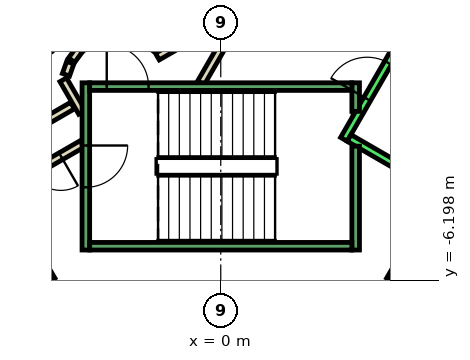
"""IFC4 building model, lengths in metres.
Left out: names, types, materials, properties, quantities, classifications, styles, units other than length and angle.
Written with IfcOpenShell. Run it as: python <this file> out.ifc"""

import sys

from ifc_helpers import new_model, si_unit, direction, frame, frame_2d, origin, place, context, subcontext, project, spatial, rectangle, extrude, element, fill, save


model = new_model("IFC4")
c1 = context("Model", 3, precision=1e-05, world=origin(), true_north=direction((0.0, 1.0)))
c2 = subcontext(c1, "Body", "Model", "MODEL_VIEW")
j1 = project(units=[si_unit("LENGTHUNIT", "METRE"), si_unit("PLANEANGLEUNIT", "RADIAN")], contexts=[c1])
p1 = place(None, origin())
s1 = spatial("IfcSite", under=j1, at=p1, CompositionType="ELEMENT")
p2 = place(p1, origin())
s2 = spatial("IfcBuilding", under=s1, at=p2, CompositionType="ELEMENT")
p3 = place(p2, frame((0.0, 0.0, 124.4)))
s3 = spatial("IfcBuildingStorey", under=s2, at=p3, CompositionType="ELEMENT", Elevation=124.4)
p4 = place(p3, frame((-3.9, -1.599, 0.0), z_axis=(0.0, 0.0, 1.0), x_axis=(-0.865969445389, -0.500096910261, 0.0)))
e1 = element("IfcWall", 1, at=p4, inside=s3, PredefinedType="PARTITIONING", context=c2, shape_type="SweptSolid", body=[
    extrude(rectangle(XDim=1.373, YDim=0.2, at=frame_2d((0.687, 0.0))), origin(), (0.0, 0.0, 1.0), 3.8),
])
p5 = place(p3, frame((-3.65, -2.61, 0.0), z_axis=(0.0, 0.0, 1.0), x_axis=(-0.866072462134, -0.499918483688, 0.0)))
e2 = element("IfcWall", 2, at=p5, inside=s3, PredefinedType="PARTITIONING", context=c2, shape_type="SweptSolid", body=[
    extrude(rectangle(XDim=2.084, YDim=0.2, at=frame_2d((1.042, 0.0))), origin(), (0.0, 0.0, 1.0), 3.8),
])
p6 = place(p5, frame((0.642, 0.0, 0.0)))
e3 = element("IfcOpeningElement", 3, at=p6, cuts=e2, PredefinedType="OPENING", context=c2, shape_type="SweptSolid", body=[
    extrude(rectangle(XDim=0.9, YDim=2.1, at=frame_2d((0.45, 1.05))), frame((0.0, 0.11, 0.0), z_axis=(0.0, -1.0, 0.0), x_axis=(1.0, 0.0, 0.0)), (0.0, 0.0, 1.0), 0.22),
])
p7 = place(p3, frame((-4.145, -0.92, 0.0), z_axis=(0.0, 0.0, 1.0), x_axis=(0.499743786207, -0.866173278362, 0.0)))
e4 = element("IfcWall", 4, at=p7, inside=s3, PredefinedType="PARTITIONING", context=c2, shape_type="SweptSolid", body=[
    extrude(rectangle(XDim=0.991, YDim=0.2, at=frame_2d((0.495, 0.0))), origin(), (0.0, 0.0, 1.0), 3.8),
])
p8 = place(p3, frame((-0.52, -1.0, 0.0), z_axis=(0.0, 0.0, 1.0), x_axis=(0.50011622646, 0.865958290007, 0.0)))
e5 = element("IfcWall", 5, at=p8, inside=s3, PredefinedType="PARTITIONING", context=c2, shape_type="SweptSolid", body=[
    extrude(rectangle(XDim=4.991, YDim=0.2, at=frame_2d((2.496, 0.0))), origin(), (0.0, 0.0, 1.0), 3.8),
])
p9 = place(p8, frame((1.945, 0.0, 0.0)))
e6 = element("IfcOpeningElement", 6, at=p9, cuts=e5, PredefinedType="OPENING", context=c2, shape_type="SweptSolid", body=[
    extrude(rectangle(XDim=1.0, YDim=2.1, at=frame_2d((0.5, 1.05))), frame((0.0, 0.11, 0.0), z_axis=(0.0, -1.0, 0.0), x_axis=(1.0, 0.0, 0.0)), (0.0, 0.0, 1.0), 0.22),
])
p10 = place(p3, frame((-0.412, 0.414, 0.0), z_axis=(0.0, 0.0, 1.0), x_axis=(-0.866017369001, -0.500013916395, 0.0)))
e7 = element("IfcWall", 7, at=p10, inside=s3, PredefinedType="PARTITIONING", context=c2, shape_type="SweptSolid", body=[
    extrude(rectangle(XDim=1.45, YDim=0.2, at=frame_2d((0.725, 0.0))), origin(), (0.0, 0.0, 1.0), 3.8),
])
p11 = place(p3, frame((-3.723, -0.131, 0.0), z_axis=(0.0, 0.0, 1.0), x_axis=(-0.594675113454, -0.803966112121, 0.0)))
e8 = element("IfcWall", 8, at=p11, inside=s3, PredefinedType="PARTITIONING", context=c2, shape_type="SweptSolid", body=[
    extrude(rectangle(XDim=0.338, YDim=0.2, at=frame_2d((0.169, 0.0))), origin(), (0.0, 0.0, 1.0), 3.8),
])
p12 = place(p3, frame((-3.96, -0.47, 0.0), z_axis=(0.0, 0.0, 1.0), x_axis=(-0.334824194261, -0.942280615813, 0.0)))
e9 = element("IfcWall", 9, at=p12, inside=s3, PredefinedType="PARTITIONING", context=c2, shape_type="SweptSolid", body=[
    extrude(rectangle(XDim=0.338, YDim=0.2, at=frame_2d((0.169, 0.0))), origin(), (0.0, 0.0, 1.0), 3.8),
])
p13 = place(p3, frame((-9.751, 2.99, 0.0), z_axis=(0.0, 0.0, 1.0), x_axis=(0.50000090737, -0.866024879913, 0.0)))
e10 = element("IfcWall", 10, at=p13, inside=s3, PredefinedType="STANDARD", context=c2, shape_type="SweptSolid", body=[
    extrude(rectangle(XDim=10.6, YDim=0.2, at=frame_2d((5.3, 0.0))), origin(), (0.0, 0.0, 1.0), 3.8),
])
p14 = place(p3, frame((3.24, -2.488, 0.0), z_axis=(0.0, 0.0, 1.0), x_axis=(0.49994636267, 0.866056369097, 0.0)))
e11 = element("IfcWall", 11, at=p14, inside=s3, PredefinedType="STANDARD", context=c2, shape_type="SweptSolid", body=[
    extrude(rectangle(XDim=2.8, YDim=0.2, at=frame_2d((1.4, 0.0))), origin(), (0.0, 0.0, 1.0), 3.8),
])
p15 = place(p14, frame((1.225, 0.0, 0.0)))
e12 = element("IfcOpeningElement", 12, at=p15, cuts=e11, PredefinedType="OPENING", context=c2, shape_type="SweptSolid", body=[
    extrude(rectangle(XDim=1.1, YDim=2.1, at=frame_2d((0.55, 1.05))), frame((0.0, 0.11, 0.0), z_axis=(0.0, -1.0, 0.0), x_axis=(1.0, 0.0, 0.0)), (0.0, 0.0, 1.0), 0.22),
])
p16 = place(p3, frame((3.377, -2.452, 0.0), z_axis=(0.0, 0.0, 1.0), x_axis=(0.865955154139, -0.50012165622, 0.0)))
e13 = element("IfcWall", 13, at=p16, inside=s3, PredefinedType="STANDARD", context=c2, shape_type="SweptSolid", body=[
    extrude(rectangle(XDim=2.4, YDim=0.2, at=frame_2d((1.2, 0.0))), origin(), (0.0, 0.0, 1.0), 3.8),
])
p17 = place(p3, frame((4.451, -6.19, 0.0), z_axis=(0.0, 0.0, 1.0), x_axis=(0.50000090737, 0.866024879913, 0.0)))
e14 = element("IfcWall", 14, at=p17, inside=s3, PredefinedType="STANDARD", context=c2, shape_type="SweptSolid", body=[
    extrude(rectangle(XDim=10.6, YDim=0.2, at=frame_2d((5.3, 0.0))), origin(), (0.0, 0.0, 1.0), 3.8),
])
p18 = place(p3, frame((-3.55, -1.0, 0.0), z_axis=(0.0, 0.0, 1.0), x_axis=(0.0, -1.0, 0.0)))
e15 = element("IfcWall", 15, at=p18, inside=s3, PredefinedType="STANDARD", context=c2, shape_type="SweptSolid", body=[
    extrude(rectangle(XDim=4.4, YDim=0.2, at=frame_2d((2.2, 0.0))), origin(), (0.0, 0.0, 1.0), 3.8),
])
p19 = place(p18, frame((1.65, 0.0, 0.0)))
e16 = element("IfcOpeningElement", 16, at=p19, cuts=e15, PredefinedType="OPENING", context=c2, shape_type="SweptSolid", body=[
    extrude(rectangle(XDim=1.1, YDim=2.2, at=frame_2d((0.55, 1.1))), frame((0.0, 0.11, 0.0), z_axis=(0.0, -1.0, 0.0), x_axis=(1.0, 0.0, 0.0)), (0.0, 0.0, 1.0), 0.22),
])
p20 = place(p3, frame((3.55, -2.667, 0.0), z_axis=(0.0, 0.0, 1.0), x_axis=(0.0, -1.0, 0.0)))
e17 = element("IfcWall", 17, at=p20, inside=s3, PredefinedType="STANDARD", context=c2, shape_type="SweptSolid", body=[
    extrude(rectangle(XDim=2.733, YDim=0.2, at=frame_2d((1.366, 0.0))), origin(), (0.0, 0.0, 1.0), 3.8),
])
p21 = place(p3, frame((3.55, -1.0, 0.0), z_axis=(0.0, 0.0, 1.0), x_axis=(0.0, -1.0, 0.0)))
e18 = element("IfcWall", 18, at=p21, inside=s3, PredefinedType="STANDARD", context=c2, shape_type="SweptSolid", body=[
    extrude(rectangle(XDim=0.751, YDim=0.2, at=frame_2d((0.375, 0.0))), origin(), (0.0, 0.0, 1.0), 3.8),
])
p22 = place(p3, frame((-3.45, -1.1, 0.0), z_axis=(0.0, 0.0, 1.0), x_axis=(1.0, 0.0, 0.0)))
e19 = element("IfcWall", 19, at=p22, inside=s3, PredefinedType="STANDARD", context=c2, shape_type="SweptSolid", body=[
    extrude(rectangle(XDim=6.9, YDim=0.2, at=frame_2d((3.45, 0.0))), origin(), (0.0, 0.0, 1.0), 3.8),
])
p23 = place(p22, frame((0.45, 0.0, 0.0)))
e20 = element("IfcOpeningElement", 20, at=p23, cuts=e19, PredefinedType="OPENING", context=c2, shape_type="SweptSolid", body=[
    extrude(rectangle(XDim=1.1, YDim=2.2, at=frame_2d((0.55, 1.1))), frame((0.0, 0.11, 0.0), z_axis=(0.0, -1.0, 0.0), x_axis=(1.0, 0.0, 0.0)), (0.0, 0.0, 1.0), 0.22),
])
p24 = place(p3, frame((-3.45, -5.3, 0.0), z_axis=(0.0, 0.0, 1.0), x_axis=(1.0, 0.0, 0.0)))
e21 = element("IfcWall", 21, at=p24, inside=s3, PredefinedType="STANDARD", context=c2, shape_type="SweptSolid", body=[
    extrude(rectangle(XDim=6.9, YDim=0.2, at=frame_2d((3.45, 0.0))), origin(), (0.0, 0.0, 1.0), 3.8),
])
p25 = place(p6, origin())
e22 = element("IfcDoor", 22, at=p25, inside=s3, OperationType="SINGLE_SWING_LEFT", PredefinedType="DOOR", context=c2, shape_type="SweptSolid", body=[
    extrude(rectangle(XDim=0.9, YDim=2.1, at=frame_2d((0.45, 1.05))), frame((0.0, 0.025, 0.0), z_axis=(0.0, -1.0, 0.0), x_axis=(1.0, 0.0, 0.0)), (0.0, 0.0, 1.0), 0.05),
])
fill(e3, e22)
p26 = place(p15, origin())
e23 = element("IfcDoor", 23, at=p26, inside=s3, OperationType="SLIDING_TO_LEFT", PredefinedType="DOOR", context=c2, shape_type="SweptSolid", body=[
    extrude(rectangle(XDim=1.1, YDim=2.1, at=frame_2d((0.55, 1.05))), frame((0.0, 0.025, 0.0), z_axis=(0.0, -1.0, 0.0), x_axis=(1.0, 0.0, 0.0)), (0.0, 0.0, 1.0), 0.05),
])
fill(e12, e23)
p27 = place(p23, origin())
e24 = element("IfcDoor", 24, at=p27, inside=s3, OperationType="SINGLE_SWING_LEFT", PredefinedType="DOOR", context=c2, shape_type="SweptSolid", body=[
    extrude(rectangle(XDim=1.1, YDim=2.2, at=frame_2d((0.55, 1.1))), frame((0.0, 0.025, 0.0), z_axis=(0.0, -1.0, 0.0), x_axis=(1.0, 0.0, 0.0)), (0.0, 0.0, 1.0), 0.05),
])
fill(e20, e24)
p28 = place(p19, origin())
e25 = element("IfcDoor", 25, at=p28, inside=s3, OperationType="SINGLE_SWING_LEFT", PredefinedType="DOOR", context=c2, shape_type="SweptSolid", body=[
    extrude(rectangle(XDim=1.1, YDim=2.2, at=frame_2d((0.55, 1.1))), frame((0.0, 0.025, 0.0), z_axis=(0.0, -1.0, 0.0), x_axis=(1.0, 0.0, 0.0)), (0.0, 0.0, 1.0), 0.05),
])
fill(e16, e25)
save(model, sys.argv[1])
